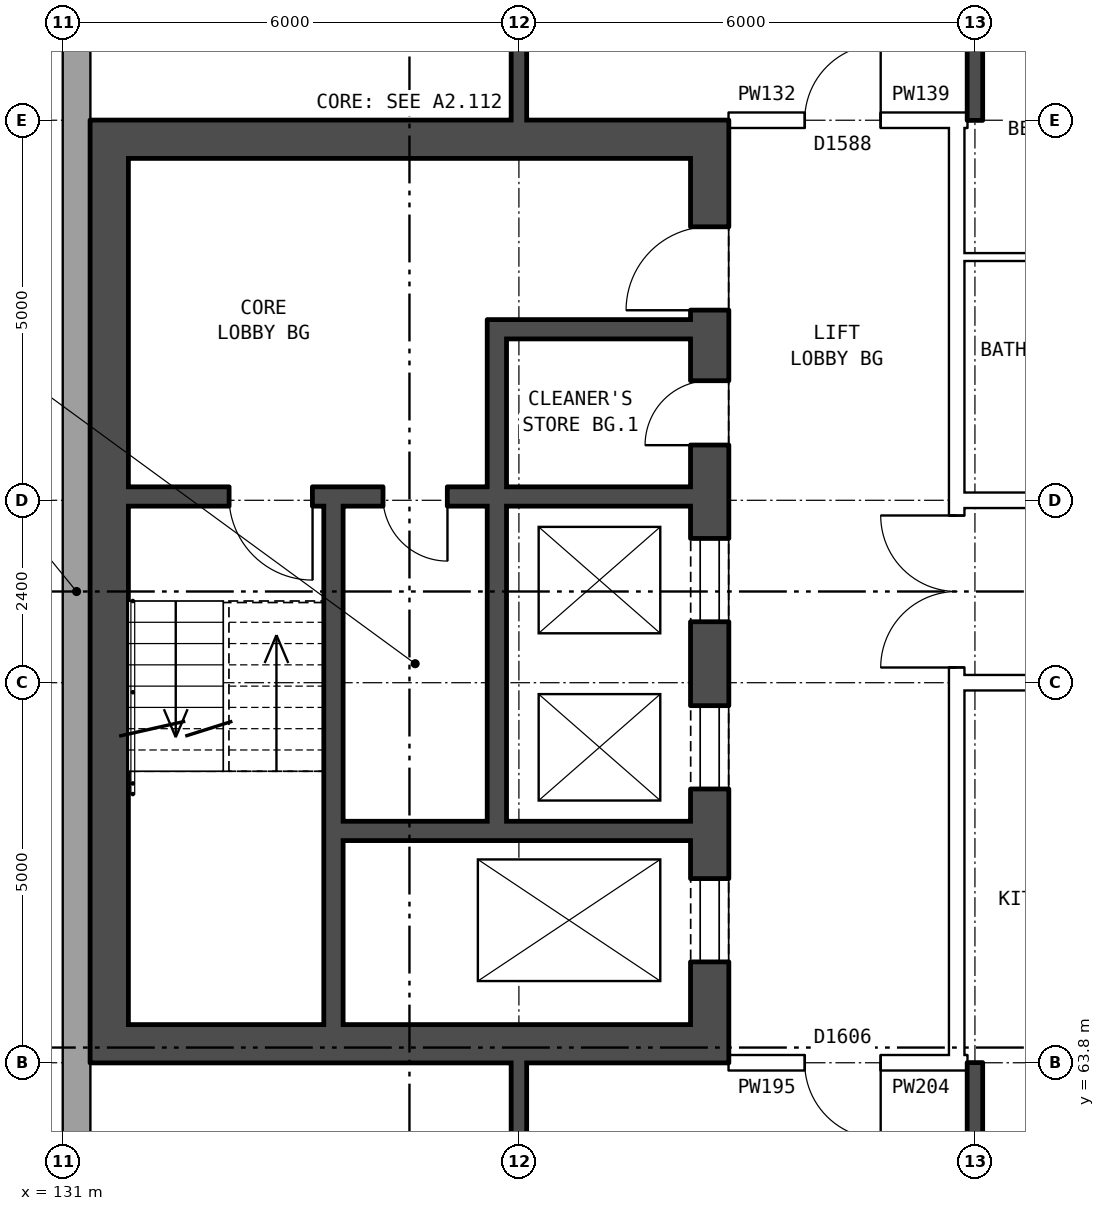
"""IFC4 building model, lengths in metres.
Left out: names, types, materials, properties, quantities, classifications, styles, units other than length and angle.
Written with IfcOpenShell. Run it as: python <this file> out.ifc"""

import sys

from ifc_helpers import new_model, si_unit, direction, frame, frame_2d, origin, place, context, subcontext, project, spatial, rectangle, extrude, element, fill, save


model = new_model("IFC4")
c1 = context("Model", 3, precision=1e-05, world=origin(), true_north=direction((0.0, 1.0)))
c2 = subcontext(c1, "Body", "Model", "MODEL_VIEW")
j1 = project(units=[si_unit("LENGTHUNIT", "METRE"), si_unit("PLANEANGLEUNIT", "RADIAN")], contexts=[c1])
p1 = place(None, origin())
s1 = spatial("IfcSite", under=j1, at=p1, CompositionType="ELEMENT")
p2 = place(p1, origin())
s2 = spatial("IfcBuilding", under=s1, at=p2, CompositionType="ELEMENT")
p3 = place(p2, frame((0.0, 0.0, 151.6)))
s3 = spatial("IfcBuildingStorey", under=s2, at=p3, CompositionType="ELEMENT", Elevation=151.6)
p4 = place(p3, frame((131.18, 82.925, 0.0), z_axis=(0.0, 0.0, 1.0), x_axis=(0.0, -1.0, 0.0)))
e1 = element("IfcWall", 1, at=p4, inside=s3, PredefinedType="STANDARD", context=c2, shape_type="SweptSolid", body=[
    extrude(rectangle(XDim=25.851, YDim=0.36, at=frame_2d((12.925, 0.0))), origin(), (0.0, 0.0, 1.0), 2.85),
])
p5 = place(p4, frame((1.625, 0.0, 0.8)))
e2 = element("IfcOpeningElement", 2, at=p5, cuts=e1, PredefinedType="OPENING", context=c2, shape_type="SweptSolid", body=[
    extrude(rectangle(XDim=1.6, YDim=1.8, at=frame_2d((0.8, 0.9))), frame((0.0, 0.19, 0.0), z_axis=(0.0, -1.0, 0.0), x_axis=(1.0, 0.0, 0.0)), (0.0, 0.0, 1.0), 0.38),
])
p6 = place(p4, frame((3.525, 0.0, 1.7)))
e3 = element("IfcOpeningElement", 3, at=p6, cuts=e1, PredefinedType="OPENING", context=c2, shape_type="SweptSolid", body=[
    extrude(rectangle(XDim=1.6, YDim=0.9, at=frame_2d((0.8, 0.45))), frame((0.0, 0.19, 0.0), z_axis=(0.0, -1.0, 0.0), x_axis=(1.0, 0.0, 0.0)), (0.0, 0.0, 1.0), 0.38),
])
p7 = place(p4, frame((20.725, 0.0, 1.7)))
e4 = element("IfcOpeningElement", 4, at=p7, cuts=e1, PredefinedType="OPENING", context=c2, shape_type="SweptSolid", body=[
    extrude(rectangle(XDim=1.6, YDim=0.9, at=frame_2d((0.8, 0.45))), frame((0.0, 0.19, 0.0), z_axis=(0.0, -1.0, 0.0), x_axis=(1.0, 0.0, 0.0)), (0.0, 0.0, 1.0), 0.38),
])
p8 = place(p4, frame((22.625, 0.0, 0.8)))
e5 = element("IfcOpeningElement", 5, at=p8, cuts=e1, PredefinedType="OPENING", context=c2, shape_type="SweptSolid", body=[
    extrude(rectangle(XDim=1.6, YDim=1.8, at=frame_2d((0.8, 0.9))), frame((0.0, 0.19, 0.0), z_axis=(0.0, -1.0, 0.0), x_axis=(1.0, 0.0, 0.0)), (0.0, 0.0, 1.0), 0.38),
])
p9 = place(p3, frame((139.51, 63.8, 0.0), z_axis=(0.0, 0.0, 1.0), x_axis=(0.0, 1.0, 0.0)))
e6 = element("IfcWall", 6, at=p9, inside=s3, PredefinedType="SHEAR", context=c2, shape_type="SweptSolid", body=[
    extrude(rectangle(XDim=12.4, YDim=0.5, at=frame_2d((6.2, 0.0))), origin(), (0.0, 0.0, 1.0), 2.85),
])
p10 = place(p9, frame((1.325, 0.0, 0.0)))
e7 = element("IfcOpeningElement", 7, at=p10, cuts=e6, PredefinedType="OPENING", context=c2, shape_type="SweptSolid", body=[
    extrude(rectangle(XDim=1.1, YDim=2.1, at=frame_2d((0.55, 1.05))), frame((0.0, 0.26, 0.0), z_axis=(0.0, -1.0, 0.0), x_axis=(1.0, 0.0, 0.0)), (0.0, 0.0, 1.0), 0.52),
])
p11 = place(p9, frame((3.6, 0.0, 0.0)))
e8 = element("IfcOpeningElement", 8, at=p11, cuts=e6, PredefinedType="OPENING", context=c2, shape_type="SweptSolid", body=[
    extrude(rectangle(XDim=1.1, YDim=2.1, at=frame_2d((0.55, 1.05))), frame((0.0, 0.26, 0.0), z_axis=(0.0, -1.0, 0.0), x_axis=(1.0, 0.0, 0.0)), (0.0, 0.0, 1.0), 0.52),
])
p12 = place(p9, frame((5.8, 0.0, 0.0)))
e9 = element("IfcOpeningElement", 9, at=p12, cuts=e6, PredefinedType="OPENING", context=c2, shape_type="SweptSolid", body=[
    extrude(rectangle(XDim=1.1, YDim=2.1, at=frame_2d((0.55, 1.05))), frame((0.0, 0.26, 0.0), z_axis=(0.0, -1.0, 0.0), x_axis=(1.0, 0.0, 0.0)), (0.0, 0.0, 1.0), 0.52),
])
p13 = place(p9, frame((9.9, 0.0, 0.0)))
e10 = element("IfcOpeningElement", 10, at=p13, cuts=e6, PredefinedType="OPENING", context=c2, shape_type="SweptSolid", body=[
    extrude(rectangle(XDim=1.1, YDim=2.1, at=frame_2d((0.55, 1.05))), frame((0.0, 0.26, 0.0), z_axis=(0.0, -1.0, 0.0), x_axis=(1.0, 0.0, 0.0)), (0.0, 0.0, 1.0), 0.52),
])
p14 = place(p9, frame((8.125, 0.0, 0.0)))
e11 = element("IfcOpeningElement", 11, at=p14, cuts=e6, PredefinedType="OPENING", context=c2, shape_type="SweptSolid", body=[
    extrude(rectangle(XDim=0.85, YDim=2.1, at=frame_2d((0.425, 1.05))), frame((0.0, 0.26, 0.0), z_axis=(0.0, -1.0, 0.0), x_axis=(1.0, 0.0, 0.0)), (0.0, 0.0, 1.0), 0.52),
])
p15 = place(p3, frame((131.61, 63.8, 0.0), z_axis=(0.0, 0.0, 1.0), x_axis=(0.0, 1.0, 0.0)))
e12 = element("IfcWall", 12, at=p15, inside=s3, PredefinedType="SHEAR", context=c2, shape_type="SweptSolid", body=[
    extrude(rectangle(XDim=12.4, YDim=0.5, at=frame_2d((6.2, 0.0))), origin(), (0.0, 0.0, 1.0), 2.85),
])
for number, where, z_axis, x_axis in (
    (13, (139.26, 64.05, 0.0), (0.0, 0.0, 1.0), (-1.0, 0.0, 0.0)),
    (14, (139.26, 75.95, 0.0), (0.0, 0.0, 1.0), (-1.0, 0.0, 0.0)),
):
    element("IfcWall", number, at=place(p3, frame(where, z_axis=z_axis, x_axis=x_axis)), inside=s3, PredefinedType="SHEAR", context=c2, shape_type="SweptSolid", body=[
        extrude(rectangle(XDim=7.4, YDim=0.5, at=frame_2d((3.7, 0.0))), origin(), (0.0, 0.0, 1.0), 2.85),
    ])
p16 = place(p3, frame((139.26, 66.85, 0.0), z_axis=(0.0, 0.0, 1.0), x_axis=(-1.0, 0.0, 0.0)))
e15 = element("IfcWall", 15, at=p16, inside=s3, PredefinedType="SHEAR", context=c2, shape_type="SweptSolid", body=[
    extrude(rectangle(XDim=4.575, YDim=0.25, at=frame_2d((2.288, 0.0))), origin(), (0.0, 0.0, 1.0), 2.85),
])
p17 = place(p3, frame((139.26, 71.25, 0.0), z_axis=(0.0, 0.0, 1.0), x_axis=(-1.0, 0.0, 0.0)))
e16 = element("IfcWall", 16, at=p17, inside=s3, PredefinedType="SHEAR", context=c2, shape_type="SweptSolid", body=[
    extrude(rectangle(XDim=7.4, YDim=0.25, at=frame_2d((3.7, 0.0))), origin(), (0.0, 0.0, 1.0), 2.85),
])
p18 = place(p17, frame((4.975, 0.0, 0.0)))
e17 = element("IfcOpeningElement", 17, at=p18, cuts=e16, PredefinedType="OPENING", context=c2, shape_type="SweptSolid", body=[
    extrude(rectangle(XDim=1.1, YDim=2.1, at=frame_2d((0.55, 1.05))), frame((0.0, 0.135, 0.0), z_axis=(0.0, -1.0, 0.0), x_axis=(1.0, 0.0, 0.0)), (0.0, 0.0, 1.0), 0.27),
])
p19 = place(p17, frame((3.2, 0.0, 0.0)))
e18 = element("IfcOpeningElement", 18, at=p19, cuts=e16, PredefinedType="OPENING", context=c2, shape_type="SweptSolid", body=[
    extrude(rectangle(XDim=0.85, YDim=2.1, at=frame_2d((0.425, 1.05))), frame((0.0, 0.135, 0.0), z_axis=(0.0, -1.0, 0.0), x_axis=(1.0, 0.0, 0.0)), (0.0, 0.0, 1.0), 0.27),
])
p20 = place(p3, frame((139.26, 73.45, 0.0), z_axis=(0.0, 0.0, 1.0), x_axis=(-1.0, 0.0, 0.0)))
e19 = element("IfcWall", 19, at=p20, inside=s3, PredefinedType="SHEAR", context=c2, shape_type="SweptSolid", body=[
    extrude(rectangle(XDim=2.425, YDim=0.25, at=frame_2d((1.212, 0.0))), origin(), (0.0, 0.0, 1.0), 2.85),
])
p21 = place(p3, frame((136.71, 66.975, 0.0), z_axis=(0.0, 0.0, 1.0), x_axis=(0.0, 1.0, 0.0)))
e20 = element("IfcWall", 20, at=p21, inside=s3, PredefinedType="SHEAR", context=c2, shape_type="SweptSolid", body=[
    extrude(rectangle(XDim=4.15, YDim=0.25, at=frame_2d((2.075, 0.0))), origin(), (0.0, 0.0, 1.0), 2.85),
])
p22 = place(p3, frame((136.71, 71.375, 0.0), z_axis=(0.0, 0.0, 1.0), x_axis=(0.0, 1.0, 0.0)))
e21 = element("IfcWall", 21, at=p22, inside=s3, PredefinedType="SHEAR", context=c2, shape_type="SweptSolid", body=[
    extrude(rectangle(XDim=2.2, YDim=0.25, at=frame_2d((1.1, 0.0))), origin(), (0.0, 0.0, 1.0), 2.85),
])
p23 = place(p3, frame((134.56, 64.3, 0.0), z_axis=(0.0, 0.0, 1.0), x_axis=(0.0, 1.0, 0.0)))
e22 = element("IfcWall", 22, at=p23, inside=s3, PredefinedType="SHEAR", context=c2, shape_type="SweptSolid", body=[
    extrude(rectangle(XDim=6.825, YDim=0.25, at=frame_2d((3.413, 0.0))), origin(), (0.0, 0.0, 1.0), 2.85),
])
p24 = place(p3, frame((142.76, 63.9, 0.0), z_axis=(0.0, 0.0, 1.0), x_axis=(0.0, 1.0, 0.0)))
e23 = element("IfcWall", 23, at=p24, inside=s3, PredefinedType="PARTITIONING", context=c2, shape_type="SweptSolid", body=[
    extrude(rectangle(XDim=12.2, YDim=0.2, at=frame_2d((6.1, 0.0))), origin(), (0.0, 0.0, 1.0), 2.85),
])
p25 = place(p24, frame((5.1, 0.0, 0.0)))
e24 = element("IfcOpeningElement", 24, at=p25, cuts=e23, PredefinedType="OPENING", context=c2, shape_type="SweptSolid", body=[
    extrude(rectangle(XDim=2.0, YDim=2.1, at=frame_2d((1.0, 1.05))), frame((0.0, 0.11, 0.0), z_axis=(0.0, -1.0, 0.0), x_axis=(1.0, 0.0, 0.0)), (0.0, 0.0, 1.0), 0.22),
])
p26 = place(p3, frame((139.76, 63.8, 0.0), z_axis=(0.0, 0.0, 1.0), x_axis=(1.0, 0.0, 0.0)))
e25 = element("IfcWall", 25, at=p26, inside=s3, PredefinedType="PARTITIONING", context=c2, shape_type="SweptSolid", body=[
    extrude(rectangle(XDim=3.0, YDim=0.2, at=frame_2d((1.5, 0.0))), origin(), (0.0, 0.0, 1.0), 2.85),
])
p27 = place(p26, frame((1.0, 0.0, 0.0)))
e26 = element("IfcOpeningElement", 26, at=p27, cuts=e25, PredefinedType="OPENING", context=c2, shape_type="SweptSolid", body=[
    extrude(rectangle(XDim=1.0, YDim=2.1, at=frame_2d((0.5, 1.05))), frame((0.0, 0.11, 0.0), z_axis=(0.0, -1.0, 0.0), x_axis=(1.0, 0.0, 0.0)), (0.0, 0.0, 1.0), 0.22),
])
p28 = place(p3, frame((142.76, 63.8, 0.0), z_axis=(0.0, 0.0, 1.0), x_axis=(1.0, 0.0, 0.0)))
e27 = element("IfcWall", 27, at=p28, inside=s3, PredefinedType="PARTITIONING", context=c2, shape_type="SweptSolid", body=[
    extrude(rectangle(XDim=0.14, YDim=0.2, at=frame_2d((0.07, 0.0))), origin(), (0.0, 0.0, 1.0), 2.85),
])
p29 = place(p3, frame((142.76, 68.8, 0.0), z_axis=(0.0, 0.0, 1.0), x_axis=(1.0, 0.0, 0.0)))
e28 = element("IfcWall", 28, at=p29, inside=s3, PredefinedType="PARTITIONING", context=c2, shape_type="SweptSolid", body=[
    extrude(rectangle(XDim=14.48, YDim=0.2, at=frame_2d((7.24, 0.0))), origin(), (0.0, 0.0, 1.0), 2.85),
])
p30 = place(p29, frame((1.12, 0.0, 0.0)))
e29 = element("IfcOpeningElement", 29, at=p30, cuts=e28, PredefinedType="OPENING", context=c2, shape_type="SweptSolid", body=[
    extrude(rectangle(XDim=1.0, YDim=2.1, at=frame_2d((0.5, 1.05))), frame((0.0, 0.11, 0.0), z_axis=(0.0, -1.0, 0.0), x_axis=(1.0, 0.0, 0.0)), (0.0, 0.0, 1.0), 0.22),
])
p31 = place(p29, frame((7.24, 0.0, 0.0)))
e30 = element("IfcOpeningElement", 30, at=p31, cuts=e28, PredefinedType="OPENING", context=c2, shape_type="SweptSolid", body=[
    extrude(rectangle(XDim=1.0, YDim=2.1, at=frame_2d((0.5, 1.05))), frame((0.0, 0.11, 0.0), z_axis=(0.0, -1.0, 0.0), x_axis=(1.0, 0.0, 0.0)), (0.0, 0.0, 1.0), 0.22),
])
p32 = place(p3, frame((142.76, 71.2, 0.0), z_axis=(0.0, 0.0, 1.0), x_axis=(1.0, 0.0, 0.0)))
e31 = element("IfcWall", 31, at=p32, inside=s3, PredefinedType="PARTITIONING", context=c2, shape_type="SweptSolid", body=[
    extrude(rectangle(XDim=14.48, YDim=0.2, at=frame_2d((7.24, 0.0))), origin(), (0.0, 0.0, 1.0), 2.85),
])
p33 = place(p32, frame((4.24, 0.0, 0.0)))
e32 = element("IfcOpeningElement", 32, at=p33, cuts=e31, PredefinedType="OPENING", context=c2, shape_type="SweptSolid", body=[
    extrude(rectangle(XDim=1.0, YDim=2.1, at=frame_2d((0.5, 1.05))), frame((0.0, 0.11, 0.0), z_axis=(0.0, -1.0, 0.0), x_axis=(1.0, 0.0, 0.0)), (0.0, 0.0, 1.0), 0.22),
])
p34 = place(p32, frame((10.24, 0.0, 0.0)))
e33 = element("IfcOpeningElement", 33, at=p34, cuts=e31, PredefinedType="OPENING", context=c2, shape_type="SweptSolid", body=[
    extrude(rectangle(XDim=1.0, YDim=2.1, at=frame_2d((0.5, 1.05))), frame((0.0, 0.11, 0.0), z_axis=(0.0, -1.0, 0.0), x_axis=(1.0, 0.0, 0.0)), (0.0, 0.0, 1.0), 0.22),
])
p35 = place(p3, frame((142.76, 74.4, 0.0), z_axis=(0.0, 0.0, 1.0), x_axis=(1.0, 0.0, 0.0)))
e34 = element("IfcWall", 34, at=p35, inside=s3, PredefinedType="PARTITIONING", context=c2, shape_type="SweptSolid", body=[
    extrude(rectangle(XDim=3.24, YDim=0.1, at=frame_2d((1.62, 0.0))), origin(), (0.0, 0.0, 1.0), 2.85),
])
p36 = place(p3, frame((139.76, 76.2, 0.0), z_axis=(0.0, 0.0, 1.0), x_axis=(1.0, 0.0, 0.0)))
e35 = element("IfcWall", 35, at=p36, inside=s3, PredefinedType="PARTITIONING", context=c2, shape_type="SweptSolid", body=[
    extrude(rectangle(XDim=3.0, YDim=0.2, at=frame_2d((1.5, 0.0))), origin(), (0.0, 0.0, 1.0), 2.85),
])
p37 = place(p36, frame((1.0, 0.0, 0.0)))
e36 = element("IfcOpeningElement", 36, at=p37, cuts=e35, PredefinedType="OPENING", context=c2, shape_type="SweptSolid", body=[
    extrude(rectangle(XDim=1.0, YDim=2.1, at=frame_2d((0.5, 1.05))), frame((0.0, 0.11, 0.0), z_axis=(0.0, -1.0, 0.0), x_axis=(1.0, 0.0, 0.0)), (0.0, 0.0, 1.0), 0.22),
])
p38 = place(p3, frame((142.76, 76.2, 0.0), z_axis=(0.0, 0.0, 1.0), x_axis=(1.0, 0.0, 0.0)))
e37 = element("IfcWall", 37, at=p38, inside=s3, PredefinedType="PARTITIONING", context=c2, shape_type="SweptSolid", body=[
    extrude(rectangle(XDim=0.14, YDim=0.2, at=frame_2d((0.07, 0.0))), origin(), (0.0, 0.0, 1.0), 2.85),
])
p39 = place(p3, frame((137.0, 54.36, 0.0), z_axis=(0.0, 0.0, 1.0), x_axis=(0.0, 1.0, 0.0)))
e38 = element("IfcWall", 38, at=p39, inside=s3, PredefinedType="SOLIDWALL", context=c2, shape_type="SweptSolid", body=[
    extrude(rectangle(XDim=9.44, YDim=0.2, at=frame_2d((4.72, 0.0))), origin(), (0.0, 0.0, 1.0), 2.85),
])
p40 = place(p39, frame((7.04, 0.0, 0.0)))
e39 = element("IfcOpeningElement", 39, at=p40, cuts=e38, PredefinedType="OPENING", context=c2, shape_type="SweptSolid", body=[
    extrude(rectangle(XDim=0.9, YDim=2.1, at=frame_2d((0.45, 1.05))), frame((0.0, 0.11, 0.0), z_axis=(0.0, -1.0, 0.0), x_axis=(1.0, 0.0, 0.0)), (0.0, 0.0, 1.0), 0.22),
])
p41 = place(p3, frame((137.0, 76.2, 0.0), z_axis=(0.0, 0.0, 1.0), x_axis=(0.0, 1.0, 0.0)))
e40 = element("IfcWall", 40, at=p41, inside=s3, PredefinedType="SOLIDWALL", context=c2, shape_type="SweptSolid", body=[
    extrude(rectangle(XDim=9.44, YDim=0.2, at=frame_2d((4.72, 0.0))), origin(), (0.0, 0.0, 1.0), 2.85),
])
p42 = place(p41, frame((7.17, 0.0, 0.0)))
e41 = element("IfcOpeningElement", 41, at=p42, cuts=e40, PredefinedType="OPENING", context=c2, shape_type="SweptSolid", body=[
    extrude(rectangle(XDim=0.9, YDim=2.1, at=frame_2d((0.45, 1.05))), frame((0.0, 0.11, 0.0), z_axis=(0.0, -1.0, 0.0), x_axis=(1.0, 0.0, 0.0)), (0.0, 0.0, 1.0), 0.22),
])
p43 = place(p41, frame((1.5, 0.0, 0.0)))
e42 = element("IfcOpeningElement", 42, at=p43, cuts=e40, PredefinedType="OPENING", context=c2, shape_type="SweptSolid", body=[
    extrude(rectangle(XDim=0.9, YDim=2.1, at=frame_2d((0.45, 1.05))), frame((0.0, 0.11, 0.0), z_axis=(0.0, -1.0, 0.0), x_axis=(1.0, 0.0, 0.0)), (0.0, 0.0, 1.0), 0.22),
])
for number, where, z_axis, x_axis in (
    (43, (143.0, 54.36, 0.0), (0.0, 0.0, 1.0), (0.0, 1.0, 0.0)),
    (44, (143.0, 76.2, 0.0), (0.0, 0.0, 1.0), (0.0, 1.0, 0.0)),
):
    element("IfcWall", number, at=place(p3, frame(where, z_axis=z_axis, x_axis=x_axis)), inside=s3, PredefinedType="SOLIDWALL", context=c2, shape_type="SweptSolid", body=[
        extrude(rectangle(XDim=9.44, YDim=0.2, at=frame_2d((4.72, 0.0))), origin(), (0.0, 0.0, 1.0), 2.85),
    ])
p44 = place(p10, origin())
e45 = element("IfcDoor", 45, at=p44, inside=s3, OperationType="DOUBLE_DOOR_SLIDING", PredefinedType="DOOR", context=c2, shape_type="SweptSolid", body=[
    extrude(rectangle(XDim=1.1, YDim=2.1, at=frame_2d((0.55, 1.05))), frame((0.0, 0.235, 0.0), z_axis=(0.0, -1.0, 0.0), x_axis=(1.0, 0.0, 0.0)), (0.0, 0.0, 1.0), 0.05),
])
fill(e7, e45)
p45 = place(p11, origin())
e46 = element("IfcDoor", 46, at=p45, inside=s3, OperationType="DOUBLE_DOOR_SLIDING", PredefinedType="DOOR", context=c2, shape_type="SweptSolid", body=[
    extrude(rectangle(XDim=1.1, YDim=2.1, at=frame_2d((0.55, 1.05))), frame((0.0, 0.235, 0.0), z_axis=(0.0, -1.0, 0.0), x_axis=(1.0, 0.0, 0.0)), (0.0, 0.0, 1.0), 0.05),
])
fill(e8, e46)
p46 = place(p12, origin())
e47 = element("IfcDoor", 47, at=p46, inside=s3, OperationType="DOUBLE_DOOR_SLIDING", PredefinedType="DOOR", context=c2, shape_type="SweptSolid", body=[
    extrude(rectangle(XDim=1.1, YDim=2.1, at=frame_2d((0.55, 1.05))), frame((0.0, 0.235, 0.0), z_axis=(0.0, -1.0, 0.0), x_axis=(1.0, 0.0, 0.0)), (0.0, 0.0, 1.0), 0.05),
])
fill(e9, e47)
p47 = place(p13, origin())
e48 = element("IfcDoor", 48, at=p47, inside=s3, OperationType="SINGLE_SWING_LEFT", PredefinedType="DOOR", context=c2, shape_type="SweptSolid", body=[
    extrude(rectangle(XDim=1.1, YDim=2.1, at=frame_2d((0.55, 1.05))), frame((0.0, 0.235, 0.0), z_axis=(0.0, -1.0, 0.0), x_axis=(1.0, 0.0, 0.0)), (0.0, 0.0, 1.0), 0.05),
])
fill(e10, e48)
p48 = place(p18, origin())
e49 = element("IfcDoor", 49, at=p48, inside=s3, OperationType="SINGLE_SWING_LEFT", PredefinedType="DOOR", context=c2, shape_type="SweptSolid", body=[
    extrude(rectangle(XDim=1.1, YDim=2.1, at=frame_2d((0.55, 1.05))), frame((0.0, 0.025, 0.0), z_axis=(0.0, -1.0, 0.0), x_axis=(1.0, 0.0, 0.0)), (0.0, 0.0, 1.0), 0.05),
])
fill(e17, e49)
p49 = place(p14, origin())
e50 = element("IfcDoor", 50, at=p49, inside=s3, OperationType="SINGLE_SWING_LEFT", PredefinedType="DOOR", context=c2, shape_type="SweptSolid", body=[
    extrude(rectangle(XDim=0.85, YDim=2.1, at=frame_2d((0.425, 1.05))), frame((0.0, 0.235, 0.0), z_axis=(0.0, -1.0, 0.0), x_axis=(1.0, 0.0, 0.0)), (0.0, 0.0, 1.0), 0.05),
])
fill(e11, e50)
p50 = place(p19, origin())
e51 = element("IfcDoor", 51, at=p50, inside=s3, OperationType="SINGLE_SWING_LEFT", PredefinedType="DOOR", context=c2, shape_type="SweptSolid", body=[
    extrude(rectangle(XDim=0.85, YDim=2.1, at=frame_2d((0.425, 1.05))), frame((0.0, 0.025, 0.0), z_axis=(0.0, -1.0, 0.0), x_axis=(1.0, 0.0, 0.0)), (0.0, 0.0, 1.0), 0.05),
])
fill(e18, e51)
p51 = place(p25, origin())
e52 = element("IfcDoor", 52, at=p51, inside=s3, OperationType="DOUBLE_DOOR_SINGLE_SWING", PredefinedType="DOOR", context=c2, shape_type="SweptSolid", body=[
    extrude(rectangle(XDim=2.0, YDim=2.1, at=frame_2d((1.0, 1.05))), frame((0.0, 0.025, 0.0), z_axis=(0.0, -1.0, 0.0), x_axis=(1.0, 0.0, 0.0)), (0.0, 0.0, 1.0), 0.05),
])
fill(e24, e52)
p52 = place(p27, frame((1.0, 0.0, 0.0), z_axis=(0.0, 0.0, 1.0), x_axis=(-1.0, 0.0, 0.0)))
e53 = element("IfcDoor", 53, at=p52, inside=s3, OperationType="SINGLE_SWING_LEFT", PredefinedType="DOOR", context=c2, shape_type="SweptSolid", body=[
    extrude(rectangle(XDim=1.0, YDim=2.1, at=frame_2d((0.5, 1.05))), frame((0.0, 0.025, 0.0), z_axis=(0.0, -1.0, 0.0), x_axis=(1.0, 0.0, 0.0)), (0.0, 0.0, 1.0), 0.05),
])
fill(e26, e53)
p53 = place(p37, origin())
e54 = element("IfcDoor", 54, at=p53, inside=s3, OperationType="SINGLE_SWING_RIGHT", PredefinedType="DOOR", context=c2, shape_type="SweptSolid", body=[
    extrude(rectangle(XDim=1.0, YDim=2.1, at=frame_2d((0.5, 1.05))), frame((0.0, 0.025, 0.0), z_axis=(0.0, -1.0, 0.0), x_axis=(1.0, 0.0, 0.0)), (0.0, 0.0, 1.0), 0.05),
])
fill(e36, e54)
save(model, sys.argv[1])
